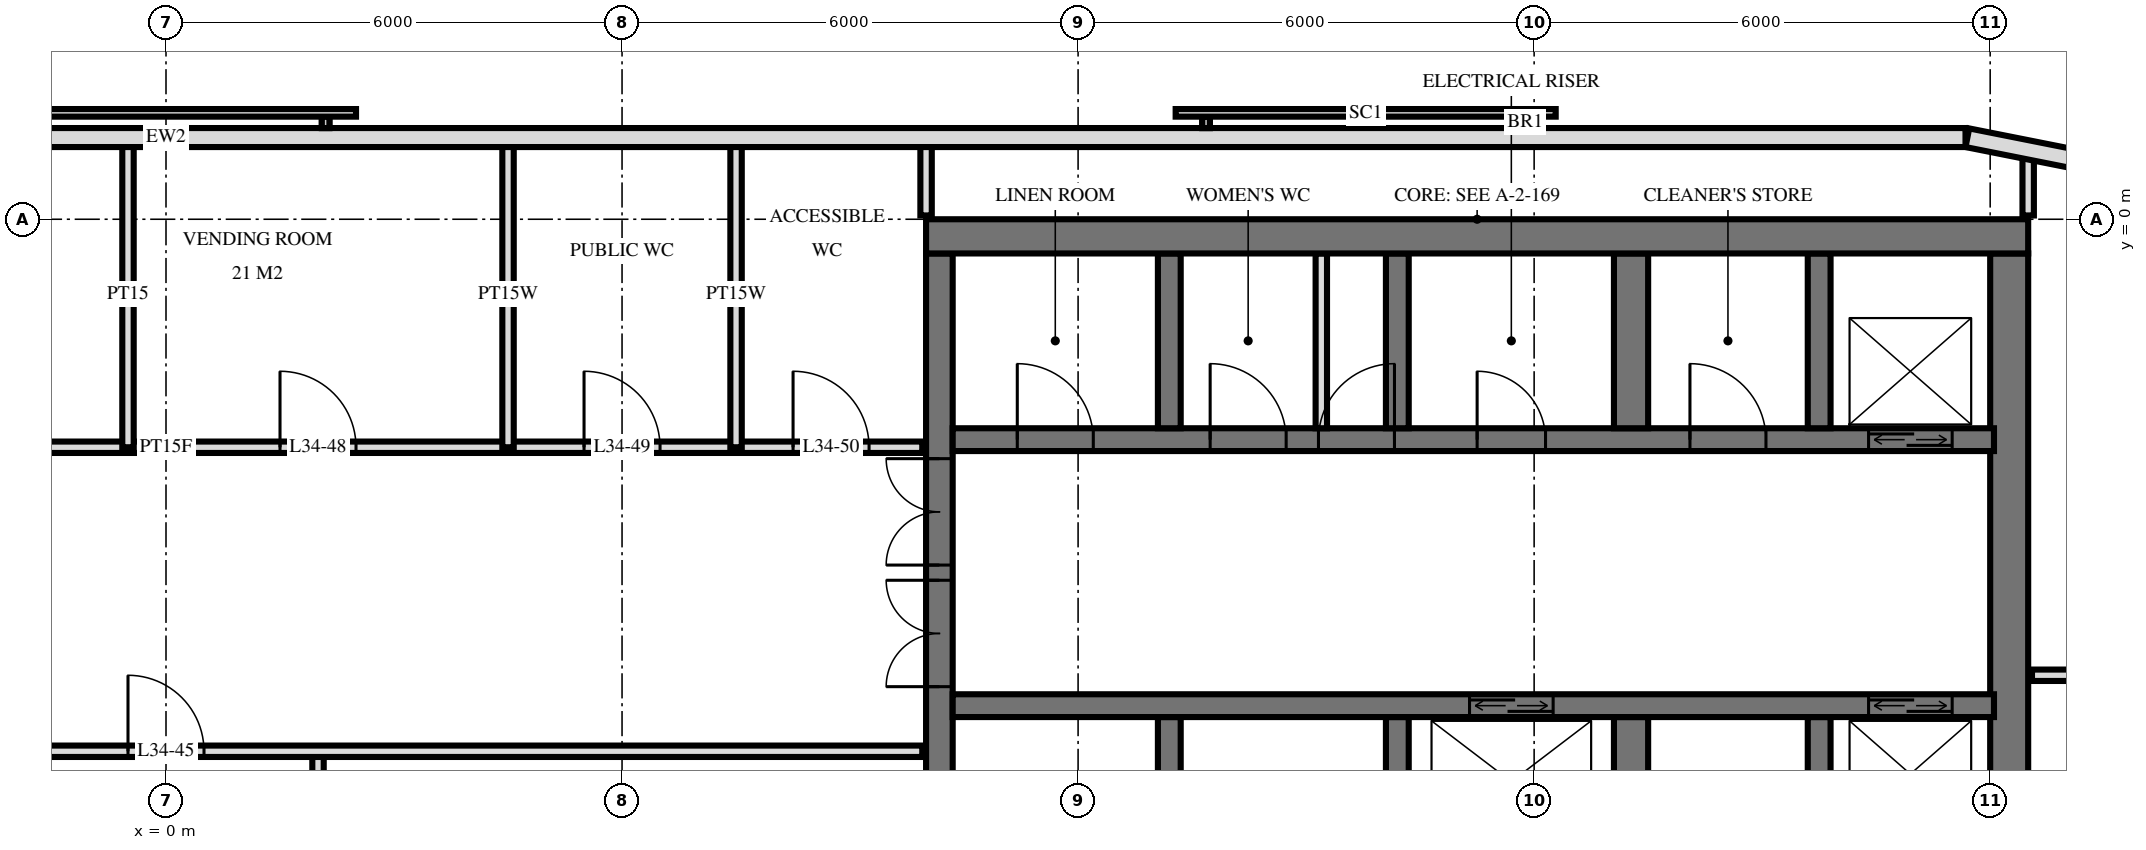
"""IFC4 building model, lengths in metres.
Left out: names, types, materials, properties, quantities, classifications, styles, units other than length and angle.
Written with IfcOpenShell. Run it as: python <this file> out.ifc"""

import sys

from ifc_helpers import new_model, si_unit, direction, frame, frame_2d, origin, place, context, subcontext, project, spatial, rectangle, extrude, element, fill, save


model = new_model("IFC4")
c1 = context("Model", 3, precision=1e-05, world=origin(), true_north=direction((0.0, 1.0)))
c2 = subcontext(c1, "Body", "Model", "MODEL_VIEW")
j1 = project(units=[si_unit("LENGTHUNIT", "METRE"), si_unit("PLANEANGLEUNIT", "RADIAN")], contexts=[c1])
p1 = place(None, origin())
s1 = spatial("IfcSite", under=j1, at=p1, CompositionType="ELEMENT")
p2 = place(p1, origin())
s2 = spatial("IfcBuilding", under=s1, at=p2, CompositionType="ELEMENT")
p3 = place(p2, frame((0.0, 0.0, 134.4)))
s3 = spatial("IfcBuildingStorey", under=s2, at=p3, CompositionType="ELEMENT", Elevation=134.4)
p4 = place(p3, frame((10.0, -0.225, 0.0), z_axis=(0.0, 0.0, 1.0), x_axis=(1.0, 0.0, 0.0)))
e1 = element("IfcWall", 1, at=p4, inside=s3, PredefinedType="SHEAR", context=c2, shape_type="SweptSolid", body=[
    extrude(rectangle(XDim=14.5, YDim=0.45, at=frame_2d((7.25, 0.0))), origin(), (0.0, 0.0, 1.0), 3.6),
])
p5 = place(p3, frame((10.175, -14.55, 0.0), z_axis=(0.0, 0.0, 1.0), x_axis=(0.0, 1.0, 0.0)))
e2 = element("IfcWall", 2, at=p5, inside=s3, PredefinedType="SHEAR", context=c2, shape_type="SweptSolid", body=[
    extrude(rectangle(XDim=14.1, YDim=0.35, at=frame_2d((7.05, 0.0))), origin(), (0.0, 0.0, 1.0), 3.6),
])
p6 = place(p5, frame((8.4, 0.0, 0.0)))
e3 = element("IfcOpeningElement", 3, at=p6, cuts=e2, PredefinedType="OPENING", context=c2, shape_type="SweptSolid", body=[
    extrude(rectangle(XDim=1.4, YDim=2.4, at=frame_2d((0.7, 1.2))), frame((0.0, 0.185, 0.0), z_axis=(0.0, -1.0, 0.0), x_axis=(1.0, 0.0, 0.0)), (0.0, 0.0, 1.0), 0.37),
])
p7 = place(p5, frame((10.0, 0.0, 0.0)))
e4 = element("IfcOpeningElement", 4, at=p7, cuts=e2, PredefinedType="OPENING", context=c2, shape_type="SweptSolid", body=[
    extrude(rectangle(XDim=1.4, YDim=2.4, at=frame_2d((0.7, 1.2))), frame((0.0, 0.185, 0.0), z_axis=(0.0, -1.0, 0.0), x_axis=(1.0, 0.0, 0.0)), (0.0, 0.0, 1.0), 0.37),
])
p8 = place(p5, frame((4.0, 0.0, 0.0)))
e5 = element("IfcOpeningElement", 5, at=p8, cuts=e2, PredefinedType="OPENING", context=c2, shape_type="SweptSolid", body=[
    extrude(rectangle(XDim=1.2, YDim=2.1, at=frame_2d((0.6, 1.05))), frame((0.0, 0.185, 0.0), z_axis=(0.0, -1.0, 0.0), x_axis=(1.0, 0.0, 0.0)), (0.0, 0.0, 1.0), 0.37),
])
p9 = place(p3, frame((24.25, -14.55, 0.0), z_axis=(0.0, 0.0, 1.0), x_axis=(0.0, 1.0, 0.0)))
e6 = element("IfcWall", 6, at=p9, inside=s3, PredefinedType="SHEAR", context=c2, shape_type="SweptSolid", body=[
    extrude(rectangle(XDim=14.1, YDim=0.5, at=frame_2d((7.05, 0.0))), origin(), (0.0, 0.0, 1.0), 3.6),
])
p10 = place(p3, frame((10.35, -2.9, 0.0), z_axis=(0.0, 0.0, 1.0), x_axis=(1.0, 0.0, 0.0)))
e7 = element("IfcWall", 7, at=p10, inside=s3, PredefinedType="SHEAR", context=c2, shape_type="SweptSolid", body=[
    extrude(rectangle(XDim=13.7, YDim=0.3, at=frame_2d((6.85, 0.0))), origin(), (0.0, 0.0, 1.0), 3.6),
])
p11 = place(p10, frame((12.05, 0.0, 0.0)))
e8 = element("IfcOpeningElement", 8, at=p11, cuts=e7, PredefinedType="OPENING", context=c2, shape_type="SweptSolid", body=[
    extrude(rectangle(XDim=1.1, YDim=2.1, at=frame_2d((0.55, 1.05))), frame((0.0, 0.16, 0.0), z_axis=(0.0, -1.0, 0.0), x_axis=(1.0, 0.0, 0.0)), (0.0, 0.0, 1.0), 0.32),
])
p12 = place(p10, frame((6.9, 0.0, 0.0)))
e9 = element("IfcOpeningElement", 9, at=p12, cuts=e7, PredefinedType="OPENING", context=c2, shape_type="SweptSolid", body=[
    extrude(rectangle(XDim=0.9, YDim=2.1, at=frame_2d((0.45, 1.05))), frame((0.0, 0.16, 0.0), z_axis=(0.0, -1.0, 0.0), x_axis=(1.0, 0.0, 0.0)), (0.0, 0.0, 1.0), 0.32),
])
p13 = place(p10, frame((0.85, 0.0, 0.0)))
e10 = element("IfcOpeningElement", 10, at=p13, cuts=e7, PredefinedType="OPENING", context=c2, shape_type="SweptSolid", body=[
    extrude(rectangle(XDim=1.0, YDim=2.1, at=frame_2d((0.5, 1.05))), frame((0.0, 0.16, 0.0), z_axis=(0.0, -1.0, 0.0), x_axis=(1.0, 0.0, 0.0)), (0.0, 0.0, 1.0), 0.32),
])
p14 = place(p10, frame((3.387, 0.0, 0.0)))
e11 = element("IfcOpeningElement", 11, at=p14, cuts=e7, PredefinedType="OPENING", context=c2, shape_type="SweptSolid", body=[
    extrude(rectangle(XDim=1.0, YDim=2.1, at=frame_2d((0.5, 1.05))), frame((0.0, 0.16, 0.0), z_axis=(0.0, -1.0, 0.0), x_axis=(1.0, 0.0, 0.0)), (0.0, 0.0, 1.0), 0.32),
])
p15 = place(p10, frame((4.812, 0.0, 0.0)))
e12 = element("IfcOpeningElement", 12, at=p15, cuts=e7, PredefinedType="OPENING", context=c2, shape_type="SweptSolid", body=[
    extrude(rectangle(XDim=1.0, YDim=2.1, at=frame_2d((0.5, 1.05))), frame((0.0, 0.16, 0.0), z_axis=(0.0, -1.0, 0.0), x_axis=(1.0, 0.0, 0.0)), (0.0, 0.0, 1.0), 0.32),
])
p16 = place(p10, frame((9.7, 0.0, 0.0)))
e13 = element("IfcOpeningElement", 13, at=p16, cuts=e7, PredefinedType="OPENING", context=c2, shape_type="SweptSolid", body=[
    extrude(rectangle(XDim=1.0, YDim=2.1, at=frame_2d((0.5, 1.05))), frame((0.0, 0.16, 0.0), z_axis=(0.0, -1.0, 0.0), x_axis=(1.0, 0.0, 0.0)), (0.0, 0.0, 1.0), 0.32),
])
p17 = place(p3, frame((10.35, -6.4, 0.0), z_axis=(0.0, 0.0, 1.0), x_axis=(1.0, 0.0, 0.0)))
e14 = element("IfcWall", 14, at=p17, inside=s3, PredefinedType="SHEAR", context=c2, shape_type="SweptSolid", body=[
    extrude(rectangle(XDim=13.7, YDim=0.3, at=frame_2d((6.85, 0.0))), origin(), (0.0, 0.0, 1.0), 3.6),
])
p18 = place(p17, frame((12.05, 0.0, 0.0)))
e15 = element("IfcOpeningElement", 15, at=p18, cuts=e14, PredefinedType="OPENING", context=c2, shape_type="SweptSolid", body=[
    extrude(rectangle(XDim=1.1, YDim=2.1, at=frame_2d((0.55, 1.05))), frame((0.0, 0.16, 0.0), z_axis=(0.0, -1.0, 0.0), x_axis=(1.0, 0.0, 0.0)), (0.0, 0.0, 1.0), 0.32),
])
p19 = place(p17, frame((6.8, 0.0, 0.0)))
e16 = element("IfcOpeningElement", 16, at=p19, cuts=e14, PredefinedType="OPENING", context=c2, shape_type="SweptSolid", body=[
    extrude(rectangle(XDim=1.1, YDim=2.1, at=frame_2d((0.55, 1.05))), frame((0.0, 0.16, 0.0), z_axis=(0.0, -1.0, 0.0), x_axis=(1.0, 0.0, 0.0)), (0.0, 0.0, 1.0), 0.32),
])
for number, where, z_axis, x_axis in (
    (17, (13.2, -2.75, 0.0), (0.0, 0.0, 1.0), (0.0, 1.0, 0.0)),
    (18, (13.2, -8.85, 0.0), (0.0, 0.0, 1.0), (0.0, 1.0, 0.0)),
    (19, (16.2, -2.75, 0.0), (0.0, 0.0, 1.0), (0.0, 1.0, 0.0)),
    (20, (16.2, -8.85, 0.0), (0.0, 0.0, 1.0), (0.0, 1.0, 0.0)),
):
    element("IfcWall", number, at=place(p3, frame(where, z_axis=z_axis, x_axis=x_axis)), inside=s3, PredefinedType="SHEAR", context=c2, shape_type="SweptSolid", body=[
        extrude(rectangle(XDim=2.3, YDim=0.3, at=frame_2d((1.15, 0.0))), origin(), (0.0, 0.0, 1.0), 3.6),
    ])
for number, where, z_axis, x_axis in (
    (21, (19.275, -2.75, 0.0), (0.0, 0.0, 1.0), (0.0, 1.0, 0.0)),
    (22, (19.275, -8.85, 0.0), (0.0, 0.0, 1.0), (0.0, 1.0, 0.0)),
):
    element("IfcWall", number, at=place(p3, frame(where, z_axis=z_axis, x_axis=x_axis)), inside=s3, PredefinedType="SHEAR", context=c2, shape_type="SweptSolid", body=[
        extrude(rectangle(XDim=2.3, YDim=0.45, at=frame_2d((1.15, 0.0))), origin(), (0.0, 0.0, 1.0), 3.6),
    ])
for number, where, z_axis, x_axis in (
    (23, (21.75, -2.75, 0.0), (0.0, 0.0, 1.0), (0.0, 1.0, 0.0)),
    (24, (21.75, -8.85, 0.0), (0.0, 0.0, 1.0), (0.0, 1.0, 0.0)),
):
    element("IfcWall", number, at=place(p3, frame(where, z_axis=z_axis, x_axis=x_axis)), inside=s3, PredefinedType="SHEAR", context=c2, shape_type="SweptSolid", body=[
        extrude(rectangle(XDim=2.3, YDim=0.3, at=frame_2d((1.15, 0.0))), origin(), (0.0, 0.0, 1.0), 3.6),
    ])
p20 = place(p3, frame((25.349, 0.745, 0.0), z_axis=(0.0, 0.0, 1.0), x_axis=(-0.980803419081, 0.194999110559, 0.0)))
e25 = element("IfcWall", 25, at=p20, inside=s3, PredefinedType="SOLIDWALL", context=c2, shape_type="SweptSolid", body=[
    extrude(rectangle(XDim=1.681, YDim=0.25, at=frame_2d((0.841, 0.0))), origin(), (0.0, 0.0, 1.0), 3.32),
])
p21 = place(p3, frame((23.675, 1.075, 0.0), z_axis=(0.0, 0.0, 1.0), x_axis=(-1.0, 0.0, 0.0)))
e26 = element("IfcWall", 26, at=p21, inside=s3, PredefinedType="SOLIDWALL", context=c2, shape_type="SweptSolid", body=[
    extrude(rectangle(XDim=47.351, YDim=0.25, at=frame_2d((23.675, 0.0))), origin(), (0.0, 0.0, 1.0), 3.32),
])
p22 = place(p21, frame((27.275, 0.0, 0.3)))
e27 = element("IfcOpeningElement", 27, at=p22, cuts=e26, PredefinedType="OPENING", context=c2, shape_type="SweptSolid", body=[
    extrude(rectangle(XDim=2.4, YDim=2.1, at=frame_2d((1.2, 1.05))), frame((0.0, 0.135, 0.0), z_axis=(0.0, -1.0, 0.0), x_axis=(1.0, 0.0, 0.0)), (0.0, 0.0, 1.0), 0.27),
])
p23 = place(p21, frame((30.275, 0.0, 0.3)))
e28 = element("IfcOpeningElement", 28, at=p23, cuts=e26, PredefinedType="OPENING", context=c2, shape_type="SweptSolid", body=[
    extrude(rectangle(XDim=2.4, YDim=2.1, at=frame_2d((1.2, 1.05))), frame((0.0, 0.135, 0.0), z_axis=(0.0, -1.0, 0.0), x_axis=(1.0, 0.0, 0.0)), (0.0, 0.0, 1.0), 0.27),
])
p24 = place(p3, frame((15.2, -2.75, 0.0), z_axis=(0.0, 0.0, 1.0), x_axis=(0.0, 1.0, 0.0)))
e29 = element("IfcWall", 29, at=p24, inside=s3, PredefinedType="PARTITIONING", context=c2, shape_type="SweptSolid", body=[
    extrude(rectangle(XDim=2.3, YDim=0.15, at=frame_2d((1.15, 0.0))), origin(), (0.0, 0.0, 1.0), 3.3),
])
p25 = place(p3, frame((24.5, 0.05, 0.0), z_axis=(0.0, 0.0, 1.0), x_axis=(0.0, 1.0, 0.0)))
e30 = element("IfcWall", 30, at=p25, inside=s3, PredefinedType="PARTITIONING", context=c2, shape_type="SweptSolid", body=[
    extrude(rectangle(XDim=0.807, YDim=0.15, at=frame_2d((0.404, 0.0))), origin(), (0.0, 0.0, 1.0), 3.32),
])
p26 = place(p3, frame((10.0, 0.05, 0.0), z_axis=(0.0, 0.0, 1.0), x_axis=(0.0, 1.0, 0.0)))
e31 = element("IfcWall", 31, at=p26, inside=s3, PredefinedType="PLUMBINGWALL", context=c2, shape_type="SweptSolid", body=[
    extrude(rectangle(XDim=0.97, YDim=0.15, at=frame_2d((0.485, 0.0))), origin(), (0.0, 0.0, 1.0), 3.32),
])
for number, where, z_axis, x_axis in (
    (32, (7.5, -3.0, 0.0), (0.0, 0.0, 1.0), (0.0, 1.0, 0.0)),
    (33, (4.5, -3.0, 0.0), (0.0, 0.0, 1.0), (0.0, 1.0, 0.0)),
):
    element("IfcWall", number, at=place(p3, frame(where, z_axis=z_axis, x_axis=x_axis)), inside=s3, PredefinedType="PLUMBINGWALL", context=c2, shape_type="SweptSolid", body=[
        extrude(rectangle(XDim=4.02, YDim=0.15, at=frame_2d((2.01, 0.0))), origin(), (0.0, 0.0, 1.0), 3.32),
    ])
p27 = place(p3, frame((2.0, -11.0, 0.0), z_axis=(0.0, 0.0, 1.0), x_axis=(0.0, 1.0, 0.0)))
e34 = element("IfcWall", 34, at=p27, inside=s3, PredefinedType="PARTITIONING", context=c2, shape_type="SweptSolid", body=[
    extrude(rectangle(XDim=4.0, YDim=0.15, at=frame_2d((2.0, 0.0))), origin(), (0.0, 0.0, 1.0), 3.32),
])
p28 = place(p3, frame((-0.5, -3.0, 0.0), z_axis=(0.0, 0.0, 1.0), x_axis=(0.0, 1.0, 0.0)))
e35 = element("IfcWall", 35, at=p28, inside=s3, PredefinedType="PARTITIONING", context=c2, shape_type="SweptSolid", body=[
    extrude(rectangle(XDim=4.02, YDim=0.15, at=frame_2d((2.01, 0.0))), origin(), (0.0, 0.0, 1.0), 3.32),
])
p29 = place(p3, frame((-9.95, -7.0, 0.0), z_axis=(0.0, 0.0, 1.0), x_axis=(1.0, 0.0, 0.0)))
e36 = element("IfcWall", 36, at=p29, inside=s3, PredefinedType="PARTITIONING", context=c2, shape_type="SweptSolid", body=[
    extrude(rectangle(XDim=19.9, YDim=0.15, at=frame_2d((9.95, 0.0))), origin(), (0.0, 0.0, 1.0), 3.32),
])
p30 = place(p29, frame((9.45, 0.0, 0.0)))
e37 = element("IfcOpeningElement", 37, at=p30, cuts=e36, PredefinedType="OPENING", context=c2, shape_type="SweptSolid", body=[
    extrude(rectangle(XDim=1.0, YDim=2.1, at=frame_2d((0.5, 1.05))), frame((0.0, 0.085, 0.0), z_axis=(0.0, -1.0, 0.0), x_axis=(1.0, 0.0, 0.0)), (0.0, 0.0, 1.0), 0.17),
])
p31 = place(p29, frame((3.45, 0.0, 0.0)))
e38 = element("IfcOpeningElement", 38, at=p31, cuts=e36, PredefinedType="OPENING", context=c2, shape_type="SweptSolid", body=[
    extrude(rectangle(XDim=1.0, YDim=2.1, at=frame_2d((0.5, 1.05))), frame((0.0, 0.085, 0.0), z_axis=(0.0, -1.0, 0.0), x_axis=(1.0, 0.0, 0.0)), (0.0, 0.0, 1.0), 0.17),
])
p32 = place(p3, frame((24.55, -6.0, 0.0), z_axis=(0.0, 0.0, 1.0), x_axis=(1.0, 0.0, 0.0)))
e39 = element("IfcWall", 39, at=p32, inside=s3, PredefinedType="PARTITIONING", context=c2, shape_type="SweptSolid", body=[
    extrude(rectangle(XDim=3.47, YDim=0.15, at=frame_2d((1.735, 0.0))), origin(), (0.0, 0.0, 1.0), 3.32),
])
p33 = place(p32, frame((1.35, 0.0, 0.0)))
e40 = element("IfcOpeningElement", 40, at=p33, cuts=e39, PredefinedType="OPENING", context=c2, shape_type="SweptSolid", body=[
    extrude(rectangle(XDim=0.9, YDim=2.1, at=frame_2d((0.45, 1.05))), frame((0.0, 0.085, 0.0), z_axis=(0.0, -1.0, 0.0), x_axis=(1.0, 0.0, 0.0)), (0.0, 0.0, 1.0), 0.17),
])
p34 = place(p3, frame((-9.95, -3.0, 0.0), z_axis=(0.0, 0.0, 1.0), x_axis=(1.0, 0.0, 0.0)))
e41 = element("IfcWall", 41, at=p34, inside=s3, PredefinedType="PARTITIONING", context=c2, shape_type="SweptSolid", body=[
    extrude(rectangle(XDim=19.9, YDim=0.15, at=frame_2d((9.95, 0.0))), origin(), (0.0, 0.0, 1.0), 3.32),
])
p35 = place(p34, frame((4.2, 0.0, 0.0)))
e42 = element("IfcOpeningElement", 42, at=p35, cuts=e41, PredefinedType="OPENING", context=c2, shape_type="SweptSolid", body=[
    extrude(rectangle(XDim=1.0, YDim=2.1, at=frame_2d((0.5, 1.05))), frame((0.0, 0.085, 0.0), z_axis=(0.0, -1.0, 0.0), x_axis=(1.0, 0.0, 0.0)), (0.0, 0.0, 1.0), 0.17),
])
p36 = place(p34, frame((11.45, 0.0, 0.0)))
e43 = element("IfcOpeningElement", 43, at=p36, cuts=e41, PredefinedType="OPENING", context=c2, shape_type="SweptSolid", body=[
    extrude(rectangle(XDim=1.0, YDim=2.1, at=frame_2d((0.5, 1.05))), frame((0.0, 0.085, 0.0), z_axis=(0.0, -1.0, 0.0), x_axis=(1.0, 0.0, 0.0)), (0.0, 0.0, 1.0), 0.17),
])
p37 = place(p34, frame((15.45, 0.0, 0.0)))
e44 = element("IfcOpeningElement", 44, at=p37, cuts=e41, PredefinedType="OPENING", context=c2, shape_type="SweptSolid", body=[
    extrude(rectangle(XDim=1.0, YDim=2.1, at=frame_2d((0.5, 1.05))), frame((0.0, 0.085, 0.0), z_axis=(0.0, -1.0, 0.0), x_axis=(1.0, 0.0, 0.0)), (0.0, 0.0, 1.0), 0.17),
])
p38 = place(p34, frame((18.2, 0.0, 0.0)))
e45 = element("IfcOpeningElement", 45, at=p38, cuts=e41, PredefinedType="OPENING", context=c2, shape_type="SweptSolid", body=[
    extrude(rectangle(XDim=1.0, YDim=2.1, at=frame_2d((0.5, 1.05))), frame((0.0, 0.085, 0.0), z_axis=(0.0, -1.0, 0.0), x_axis=(1.0, 0.0, 0.0)), (0.0, 0.0, 1.0), 0.17),
])
p39 = place(p11, origin())
e46 = element("IfcDoor", 46, at=p39, inside=s3, OperationType="DOUBLE_DOOR_SLIDING", PredefinedType="USERDEFINED", context=c2, shape_type="SweptSolid", body=[
    extrude(rectangle(XDim=1.1, YDim=2.1, at=frame_2d((0.55, 1.05))), frame((0.0, 0.025, 0.0), z_axis=(0.0, -1.0, 0.0), x_axis=(1.0, 0.0, 0.0)), (0.0, 0.0, 1.0), 0.05),
])
fill(e8, e46)
p40 = place(p18, origin())
e47 = element("IfcDoor", 47, at=p40, inside=s3, OperationType="DOUBLE_DOOR_SLIDING", PredefinedType="USERDEFINED", context=c2, shape_type="SweptSolid", body=[
    extrude(rectangle(XDim=1.1, YDim=2.1, at=frame_2d((0.55, 1.05))), frame((0.0, 0.025, 0.0), z_axis=(0.0, -1.0, 0.0), x_axis=(1.0, 0.0, 0.0)), (0.0, 0.0, 1.0), 0.05),
])
fill(e15, e47)
p41 = place(p19, origin())
e48 = element("IfcDoor", 48, at=p41, inside=s3, OperationType="DOUBLE_DOOR_SLIDING", PredefinedType="USERDEFINED", context=c2, shape_type="SweptSolid", body=[
    extrude(rectangle(XDim=1.1, YDim=2.1, at=frame_2d((0.55, 1.05))), frame((0.0, 0.025, 0.0), z_axis=(0.0, -1.0, 0.0), x_axis=(1.0, 0.0, 0.0)), (0.0, 0.0, 1.0), 0.05),
])
fill(e16, e48)
p42 = place(p6, origin())
e49 = element("IfcDoor", 49, at=p42, inside=s3, OperationType="DOUBLE_DOOR_SINGLE_SWING", PredefinedType="DOOR", context=c2, shape_type="SweptSolid", body=[
    extrude(rectangle(XDim=1.4, YDim=2.4, at=frame_2d((0.7, 1.2))), frame((0.0, 0.025, 0.0), z_axis=(0.0, -1.0, 0.0), x_axis=(1.0, 0.0, 0.0)), (0.0, 0.0, 1.0), 0.05),
])
fill(e3, e49)
p43 = place(p7, origin())
e50 = element("IfcDoor", 50, at=p43, inside=s3, OperationType="DOUBLE_DOOR_SINGLE_SWING", PredefinedType="DOOR", context=c2, shape_type="SweptSolid", body=[
    extrude(rectangle(XDim=1.4, YDim=2.4, at=frame_2d((0.7, 1.2))), frame((0.0, 0.025, 0.0), z_axis=(0.0, -1.0, 0.0), x_axis=(1.0, 0.0, 0.0)), (0.0, 0.0, 1.0), 0.05),
])
fill(e4, e50)
p44 = place(p12, origin())
e51 = element("IfcDoor", 51, at=p44, inside=s3, OperationType="SINGLE_SWING_RIGHT", PredefinedType="DOOR", context=c2, shape_type="SweptSolid", body=[
    extrude(rectangle(XDim=0.9, YDim=2.1, at=frame_2d((0.45, 1.05))), frame((0.0, 0.025, 0.0), z_axis=(0.0, -1.0, 0.0), x_axis=(1.0, 0.0, 0.0)), (0.0, 0.0, 1.0), 0.05),
])
fill(e9, e51)
p45 = place(p13, origin())
e52 = element("IfcDoor", 52, at=p45, inside=s3, OperationType="SINGLE_SWING_RIGHT", PredefinedType="DOOR", context=c2, shape_type="SweptSolid", body=[
    extrude(rectangle(XDim=1.0, YDim=2.1, at=frame_2d((0.5, 1.05))), frame((0.0, 0.025, 0.0), z_axis=(0.0, -1.0, 0.0), x_axis=(1.0, 0.0, 0.0)), (0.0, 0.0, 1.0), 0.05),
])
fill(e10, e52)
p46 = place(p14, origin())
e53 = element("IfcDoor", 53, at=p46, inside=s3, OperationType="SINGLE_SWING_RIGHT", PredefinedType="DOOR", context=c2, shape_type="SweptSolid", body=[
    extrude(rectangle(XDim=1.0, YDim=2.1, at=frame_2d((0.5, 1.05))), frame((0.0, 0.025, 0.0), z_axis=(0.0, -1.0, 0.0), x_axis=(1.0, 0.0, 0.0)), (0.0, 0.0, 1.0), 0.05),
])
fill(e11, e53)
p47 = place(p15, origin())
e54 = element("IfcDoor", 54, at=p47, inside=s3, OperationType="SINGLE_SWING_LEFT", PredefinedType="DOOR", context=c2, shape_type="SweptSolid", body=[
    extrude(rectangle(XDim=1.0, YDim=2.1, at=frame_2d((0.5, 1.05))), frame((0.0, 0.025, 0.0), z_axis=(0.0, -1.0, 0.0), x_axis=(1.0, 0.0, 0.0)), (0.0, 0.0, 1.0), 0.05),
])
fill(e12, e54)
p48 = place(p16, origin())
e55 = element("IfcDoor", 55, at=p48, inside=s3, OperationType="SINGLE_SWING_RIGHT", PredefinedType="DOOR", context=c2, shape_type="SweptSolid", body=[
    extrude(rectangle(XDim=1.0, YDim=2.1, at=frame_2d((0.5, 1.05))), frame((0.0, 0.025, 0.0), z_axis=(0.0, -1.0, 0.0), x_axis=(1.0, 0.0, 0.0)), (0.0, 0.0, 1.0), 0.05),
])
fill(e13, e55)
p49 = place(p30, origin())
e56 = element("IfcDoor", 56, at=p49, inside=s3, OperationType="SINGLE_SWING_RIGHT", PredefinedType="DOOR", context=c2, shape_type="SweptSolid", body=[
    extrude(rectangle(XDim=1.0, YDim=2.1, at=frame_2d((0.5, 1.05))), frame((0.0, 0.025, 0.0), z_axis=(0.0, -1.0, 0.0), x_axis=(1.0, 0.0, 0.0)), (0.0, 0.0, 1.0), 0.05),
])
fill(e37, e56)
p50 = place(p36, origin())
e57 = element("IfcDoor", 57, at=p50, inside=s3, OperationType="SINGLE_SWING_RIGHT", PredefinedType="DOOR", context=c2, shape_type="SweptSolid", body=[
    extrude(rectangle(XDim=1.0, YDim=2.1, at=frame_2d((0.5, 1.05))), frame((0.0, 0.025, 0.0), z_axis=(0.0, -1.0, 0.0), x_axis=(1.0, 0.0, 0.0)), (0.0, 0.0, 1.0), 0.05),
])
fill(e43, e57)
p51 = place(p37, origin())
e58 = element("IfcDoor", 58, at=p51, inside=s3, OperationType="SINGLE_SWING_RIGHT", PredefinedType="DOOR", context=c2, shape_type="SweptSolid", body=[
    extrude(rectangle(XDim=1.0, YDim=2.1, at=frame_2d((0.5, 1.05))), frame((0.0, 0.025, 0.0), z_axis=(0.0, -1.0, 0.0), x_axis=(1.0, 0.0, 0.0)), (0.0, 0.0, 1.0), 0.05),
])
fill(e44, e58)
p52 = place(p38, origin())
e59 = element("IfcDoor", 59, at=p52, inside=s3, OperationType="SINGLE_SWING_RIGHT", PredefinedType="DOOR", context=c2, shape_type="SweptSolid", body=[
    extrude(rectangle(XDim=1.0, YDim=2.1, at=frame_2d((0.5, 1.05))), frame((0.0, 0.025, 0.0), z_axis=(0.0, -1.0, 0.0), x_axis=(1.0, 0.0, 0.0)), (0.0, 0.0, 1.0), 0.05),
])
fill(e45, e59)
save(model, sys.argv[1])
